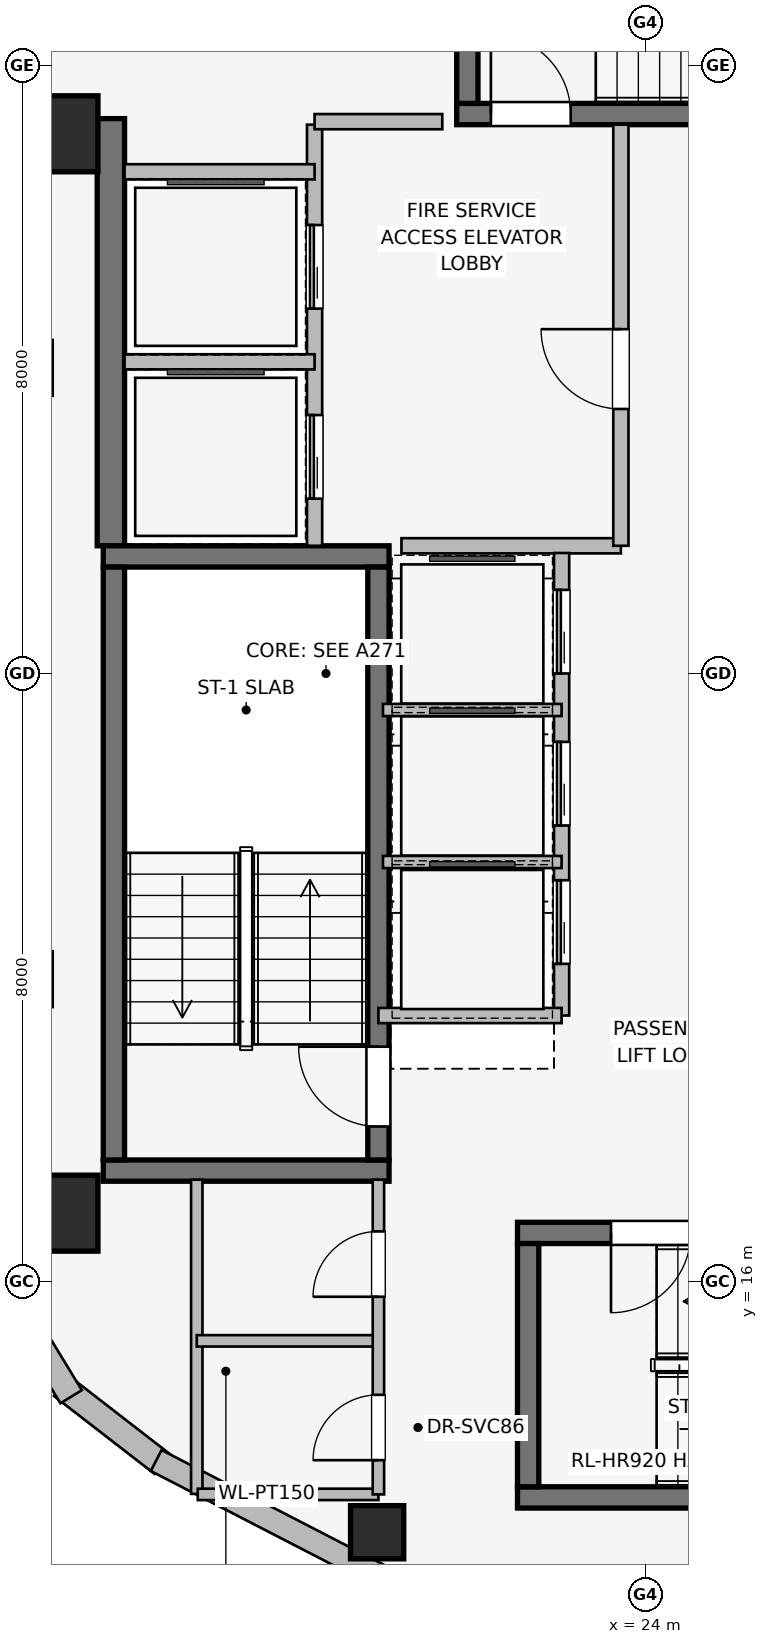
"""IFC4 building model, lengths in metres.
Left out: names, types, materials, properties, quantities, classifications, styles, units other than length and angle.
Written with IfcOpenShell. Run it as: python <this file> out.ifc"""

import sys

from ifc_helpers import new_model, si_unit, direction, frame, frame_2d, origin, origin_2d, place, context, subcontext, project, spatial, rectangle, extrude, element, fill, save


model = new_model("IFC4")
c1 = context("Model", 3, precision=1e-05, world=origin(), true_north=direction((0.0, 1.0)))
c2 = subcontext(c1, "Body", "Model", "MODEL_VIEW")
j1 = project(units=[si_unit("LENGTHUNIT", "METRE"), si_unit("PLANEANGLEUNIT", "RADIAN")], contexts=[c1])
p1 = place(None, origin())
s1 = spatial("IfcSite", under=j1, at=p1, CompositionType="ELEMENT")
p2 = place(p1, origin())
s2 = spatial("IfcBuilding", under=s1, at=p2, CompositionType="ELEMENT")
p3 = place(p2, frame((0.0, 0.0, 252.55)))
s3 = spatial("IfcBuildingStorey", under=s2, at=p3, CompositionType="ELEMENT", Elevation=252.55)
p4 = place(p3, frame((16.97, 25.68, 0.0), z_axis=(0.0, 0.0, 1.0), x_axis=(0.0, 1.0, 0.0)))
e1 = element("IfcWall", 1, at=p4, inside=s3, PredefinedType="SHEAR", context=c2, shape_type="SweptSolid", body=[
    extrude(rectangle(XDim=5.62, YDim=0.36, at=frame_2d((2.81, 0.0))), origin(), (0.0, 0.0, 1.0), 3.55),
])
for number, where, z_axis, x_axis in (
    (2, (16.87, 17.46, 0.0), (0.0, 0.0, 1.0), (1.0, 0.0, 0.0)),
    (3, (20.63, 25.54, 0.0), (0.0, 0.0, 1.0), (-1.0, 0.0, 0.0)),
):
    element("IfcWall", number, at=place(p3, frame(where, z_axis=z_axis, x_axis=x_axis)), inside=s3, PredefinedType="SHEAR", context=c2, shape_type="SweptSolid", body=[
        extrude(rectangle(XDim=3.76, YDim=0.28, at=frame_2d((1.88, 0.0))), origin(), (0.0, 0.0, 1.0), 3.55),
    ])
p5 = place(p3, frame((17.01, 25.4, 0.0), z_axis=(0.0, 0.0, 1.0), x_axis=(0.0, -1.0, 0.0)))
e4 = element("IfcWall", 4, at=p5, inside=s3, PredefinedType="SHEAR", context=c2, shape_type="SweptSolid", body=[
    extrude(rectangle(XDim=7.8, YDim=0.28, at=frame_2d((3.9, 0.0))), origin(), (0.0, 0.0, 1.0), 3.55),
])
p6 = place(p3, frame((20.49, 17.6, 0.0), z_axis=(0.0, 0.0, 1.0), x_axis=(0.0, 1.0, 0.0)))
e5 = element("IfcWall", 5, at=p6, inside=s3, PredefinedType="SHEAR", context=c2, shape_type="SweptSolid", body=[
    extrude(rectangle(XDim=7.8, YDim=0.28, at=frame_2d((3.9, 0.0))), origin(), (0.0, 0.0, 1.0), 3.55),
])
p7 = place(p6, frame((0.44, 0.0, 0.0)))
e6 = element("IfcOpeningElement", 6, at=p7, cuts=e5, PredefinedType="OPENING", context=c2, shape_type="SweptSolid", body=[
    extrude(rectangle(XDim=1.05, YDim=2.0, at=frame_2d((0.525, 1.0))), frame((0.0, 0.15, 0.0), z_axis=(0.0, -1.0, 0.0), x_axis=(1.0, 0.0, 0.0)), (0.0, 0.0, 1.0), 0.3),
])
p8 = place(p3, frame((22.32, 13.16, 0.0), z_axis=(0.0, 0.0, 1.0), x_axis=(1.0, 0.0, 0.0)))
e7 = element("IfcWall", 7, at=p8, inside=s3, PredefinedType="SHEAR", context=c2, shape_type="SweptSolid", body=[
    extrude(rectangle(XDim=8.36, YDim=0.28, at=frame_2d((4.18, 0.0))), origin(), (0.0, 0.0, 1.0), 3.55),
])
p9 = place(p3, frame((30.68, 16.64, 0.0), z_axis=(0.0, 0.0, 1.0), x_axis=(-1.0, 0.0, 0.0)))
e8 = element("IfcWall", 8, at=p9, inside=s3, PredefinedType="SHEAR", context=c2, shape_type="SweptSolid", body=[
    extrude(rectangle(XDim=8.36, YDim=0.28, at=frame_2d((4.18, 0.0))), origin(), (0.0, 0.0, 1.0), 3.55),
])
p10 = place(p9, frame((6.08, 0.0, 0.0)))
e9 = element("IfcOpeningElement", 9, at=p10, cuts=e8, PredefinedType="OPENING", context=c2, shape_type="SweptSolid", body=[
    extrude(rectangle(XDim=1.05, YDim=2.0, at=frame_2d((0.525, 1.0))), frame((0.0, 0.15, 0.0), z_axis=(0.0, -1.0, 0.0), x_axis=(1.0, 0.0, 0.0)), (0.0, 0.0, 1.0), 0.3),
])
p11 = place(p3, frame((22.46, 16.5, 0.0), z_axis=(0.0, 0.0, 1.0), x_axis=(0.0, -1.0, 0.0)))
e10 = element("IfcWall", 10, at=p11, inside=s3, PredefinedType="SHEAR", context=c2, shape_type="SweptSolid", body=[
    extrude(rectangle(XDim=3.2, YDim=0.28, at=frame_2d((1.6, 0.0))), origin(), (0.0, 0.0, 1.0), 3.55),
])
p12 = place(p3, frame((21.52, 31.36, 0.0), z_axis=(0.0, 0.0, 1.0), x_axis=(1.0, 0.0, 0.0)))
e11 = element("IfcWall", 11, at=p12, inside=s3, PredefinedType="SHEAR", context=c2, shape_type="SweptSolid", body=[
    extrude(rectangle(XDim=8.36, YDim=0.28, at=frame_2d((4.18, 0.0))), origin(), (0.0, 0.0, 1.0), 3.55),
])
p13 = place(p12, frame((0.45, 0.0, 0.0)))
e12 = element("IfcOpeningElement", 12, at=p13, cuts=e11, PredefinedType="OPENING", context=c2, shape_type="SweptSolid", body=[
    extrude(rectangle(XDim=1.05, YDim=2.0, at=frame_2d((0.525, 1.0))), frame((0.0, 0.15, 0.0), z_axis=(0.0, -1.0, 0.0), x_axis=(1.0, 0.0, 0.0)), (0.0, 0.0, 1.0), 0.3),
])
p14 = place(p3, frame((21.66, 34.7, 0.0), z_axis=(0.0, 0.0, 1.0), x_axis=(0.0, -1.0, 0.0)))
e13 = element("IfcWall", 13, at=p14, inside=s3, PredefinedType="SHEAR", context=c2, shape_type="SweptSolid", body=[
    extrude(rectangle(XDim=3.2, YDim=0.28, at=frame_2d((1.6, 0.0))), origin(), (0.0, 0.0, 1.0), 3.55),
])
for number, where, z_axis, x_axis in (
    (14, (16.3, 16.9, 0.0), (0.0, 0.0, 1.0), (1.0, 0.0, 0.0)),
    (15, (16.3, 31.1, 0.0), (0.0, 0.0, 1.0), (1.0, 0.0, 0.0)),
):
    element("IfcColumn", number, at=place(p3, frame(where, z_axis=z_axis, x_axis=x_axis)), inside=s3, PredefinedType="COLUMN", context=c2, shape_type="SweptSolid", body=[
        extrude(rectangle(XDim=1.0, YDim=1.0, at=origin_2d()), origin(), (0.0, 0.0, 1.0), 3.55),
    ])
p15 = place(p3, frame((20.473, 12.702, 0.0), z_axis=(0.0, 0.0, 1.0), x_axis=(1.0, 0.0, 0.0)))
e16 = element("IfcColumn", 16, at=p15, inside=s3, PredefinedType="COLUMN", context=c2, shape_type="SweptSolid", body=[
    extrude(rectangle(XDim=0.7, YDim=0.7, at=origin_2d()), origin(), (0.0, 0.0, 1.0), 3.55),
])
p16 = place(p3, frame((15.574, 32.082, 0.0), z_axis=(0.0, 0.0, 1.0), x_axis=(0.520325409202, 0.853968072318, 0.0)))
e17 = element("IfcWall", 17, at=p16, inside=s3, PredefinedType="STANDARD", context=c2, shape_type="SweptSolid", body=[
    extrude(rectangle(XDim=1.678, YDim=0.33, at=frame_2d((0.839, 0.0))), origin(), (0.0, 0.0, 1.0), 3.29),
])
p17 = place(p3, frame((17.647, 13.599, 0.0), z_axis=(0.0, 0.0, 1.0), x_axis=(-0.790691856293, 0.61221433207, 0.0)))
e18 = element("IfcWall", 18, at=p17, inside=s3, PredefinedType="STANDARD", context=c2, shape_type="SweptSolid", body=[
    extrude(rectangle(XDim=1.676, YDim=0.33, at=frame_2d((0.838, 0.0))), origin(), (0.0, 0.0, 1.0), 3.29),
])
p18 = place(p3, frame((16.447, 14.485, 0.0), z_axis=(0.0, 0.0, 1.0), x_axis=(-0.520325409202, 0.853968072318, 0.0)))
e19 = element("IfcWall", 19, at=p18, inside=s3, PredefinedType="STANDARD", context=c2, shape_type="SweptSolid", body=[
    extrude(rectangle(XDim=1.678, YDim=0.33, at=frame_2d((0.839, 0.0))), origin(), (0.0, 0.0, 1.0), 3.29),
])
p19 = place(p3, frame((30.963, 6.73, 0.0), z_axis=(0.0, 0.0, 1.0), x_axis=(-0.888581481622, 0.458718814218, 0.0)))
e20 = element("IfcWall", 20, at=p19, inside=s3, PredefinedType="STANDARD", context=c2, shape_type="SweptSolid", body=[
    extrude(rectangle(XDim=15.077, YDim=0.31, at=frame_2d((7.539, 0.0))), origin(), (0.0, 0.0, 1.0), 3.29),
])
p20 = place(p19, frame((0.998, 0.0, 0.75)))
e21 = element("IfcOpeningElement", 21, at=p20, cuts=e20, PredefinedType="OPENING", context=c2, shape_type="SweptSolid", body=[
    extrude(rectangle(XDim=1.05, YDim=1.4, at=frame_2d((0.525, 0.7))), frame((0.0, 0.165, 0.0), z_axis=(0.0, -1.0, 0.0), x_axis=(1.0, 0.0, 0.0)), (0.0, 0.0, 1.0), 0.33),
])
p21 = place(p19, frame((4.176, 0.0, 0.75)))
e22 = element("IfcOpeningElement", 22, at=p21, cuts=e20, PredefinedType="OPENING", context=c2, shape_type="SweptSolid", body=[
    extrude(rectangle(XDim=1.05, YDim=1.4, at=frame_2d((0.525, 0.7))), frame((0.0, 0.165, 0.0), z_axis=(0.0, -1.0, 0.0), x_axis=(1.0, 0.0, 0.0)), (0.0, 0.0, 1.0), 0.33),
])
p22 = place(p19, frame((6.509, 0.0, 0.75)))
e23 = element("IfcOpeningElement", 23, at=p22, cuts=e20, PredefinedType="OPENING", context=c2, shape_type="SweptSolid", body=[
    extrude(rectangle(XDim=1.05, YDim=1.4, at=frame_2d((0.525, 0.7))), frame((0.0, 0.165, 0.0), z_axis=(0.0, -1.0, 0.0), x_axis=(1.0, 0.0, 0.0)), (0.0, 0.0, 1.0), 0.33),
])
p23 = place(p19, frame((8.842, 0.0, 0.75)))
e24 = element("IfcOpeningElement", 24, at=p23, cuts=e20, PredefinedType="OPENING", context=c2, shape_type="SweptSolid", body=[
    extrude(rectangle(XDim=1.05, YDim=1.4, at=frame_2d((0.525, 0.7))), frame((0.0, 0.165, 0.0), z_axis=(0.0, -1.0, 0.0), x_axis=(1.0, 0.0, 0.0)), (0.0, 0.0, 1.0), 0.33),
])
p24 = place(p3, frame((19.65, 25.68, 0.0), z_axis=(0.0, 0.0, 1.0), x_axis=(0.0, 1.0, 0.0)))
e25 = element("IfcWall", 25, at=p24, inside=s3, PredefinedType="PARTITIONING", context=c2, shape_type="SweptSolid", body=[
    extrude(rectangle(XDim=5.54, YDim=0.2, at=frame_2d((2.77, 0.0))), origin(), (0.0, 0.0, 1.0), 3.29),
])
p25 = place(p24, frame((0.62, 0.0, 0.0)))
e26 = element("IfcOpeningElement", 26, at=p25, cuts=e25, PredefinedType="OPENING", context=c2, shape_type="SweptSolid", body=[
    extrude(rectangle(XDim=1.1, YDim=2.2, at=frame_2d((0.55, 1.1))), frame((0.0, 0.11, 0.0), z_axis=(0.0, -1.0, 0.0), x_axis=(1.0, 0.0, 0.0)), (0.0, 0.0, 1.0), 0.22),
])
p26 = place(p24, frame((3.12, 0.0, 0.0)))
e27 = element("IfcOpeningElement", 27, at=p26, cuts=e25, PredefinedType="OPENING", context=c2, shape_type="SweptSolid", body=[
    extrude(rectangle(XDim=1.1, YDim=2.2, at=frame_2d((0.55, 1.1))), frame((0.0, 0.11, 0.0), z_axis=(0.0, -1.0, 0.0), x_axis=(1.0, 0.0, 0.0)), (0.0, 0.0, 1.0), 0.22),
])
p27 = place(p3, frame((20.793, 25.68, 0.0), z_axis=(0.0, 0.0, 1.0), x_axis=(1.0, 0.0, 0.0)))
e28 = element("IfcWall", 28, at=p27, inside=s3, PredefinedType="PARTITIONING", context=c2, shape_type="SweptSolid", body=[
    extrude(rectangle(XDim=2.887, YDim=0.2, at=frame_2d((1.443, 0.0))), origin(), (0.0, 0.0, 1.0), 3.29),
])
p28 = place(p3, frame((23.68, 25.68, 0.0), z_axis=(0.0, 0.0, 1.0), x_axis=(0.0, 1.0, 0.0)))
e29 = element("IfcWall", 29, at=p28, inside=s3, PredefinedType="PARTITIONING", context=c2, shape_type="SweptSolid", body=[
    extrude(rectangle(XDim=5.54, YDim=0.2, at=frame_2d((2.77, 0.0))), origin(), (0.0, 0.0, 1.0), 3.29),
])
p29 = place(p28, frame((1.8, 0.0, 0.0)))
e30 = element("IfcOpeningElement", 30, at=p29, cuts=e29, PredefinedType="OPENING", context=c2, shape_type="SweptSolid", body=[
    extrude(rectangle(XDim=1.05, YDim=2.0, at=frame_2d((0.525, 1.0))), frame((0.0, 0.11, 0.0), z_axis=(0.0, -1.0, 0.0), x_axis=(1.0, 0.0, 0.0)), (0.0, 0.0, 1.0), 0.22),
])
p30 = place(p3, frame((21.33, 31.26, 0.0), z_axis=(0.0, 0.0, 1.0), x_axis=(-1.0, 0.0, 0.0)))
e31 = element("IfcWall", 31, at=p30, inside=s3, PredefinedType="PARTITIONING", context=c2, shape_type="SweptSolid", body=[
    extrude(rectangle(XDim=1.68, YDim=0.2, at=frame_2d((0.84, 0.0))), origin(), (0.0, 0.0, 1.0), 3.29),
])
p31 = place(p3, frame((17.15, 28.1, 0.0), z_axis=(0.0, 0.0, 1.0), x_axis=(1.0, 0.0, 0.0)))
e32 = element("IfcWall", 32, at=p31, inside=s3, PredefinedType="PARTITIONING", context=c2, shape_type="SweptSolid", body=[
    extrude(rectangle(XDim=2.5, YDim=0.2, at=frame_2d((1.25, 0.0))), origin(), (0.0, 0.0, 1.0), 3.29),
])
p32 = place(p3, frame((19.65, 30.6, 0.0), z_axis=(0.0, 0.0, 1.0), x_axis=(-1.0, 0.0, 0.0)))
e33 = element("IfcWall", 33, at=p32, inside=s3, PredefinedType="PARTITIONING", context=c2, shape_type="SweptSolid", body=[
    extrude(rectangle(XDim=2.5, YDim=0.2, at=frame_2d((1.25, 0.0))), origin(), (0.0, 0.0, 1.0), 2.19),
])
p33 = place(p3, frame((22.9, 19.5, 0.0), z_axis=(0.0, 0.0, 1.0), x_axis=(0.0, 1.0, 0.0)))
e34 = element("IfcWall", 34, at=p33, inside=s3, PredefinedType="PARTITIONING", context=c2, shape_type="SweptSolid", body=[
    extrude(rectangle(XDim=6.085, YDim=0.2, at=frame_2d((3.042, 0.0))), origin(), (0.0, 0.0, 1.0), 3.29),
])
p34 = place(p33, frame((0.68, 0.0, 0.0)))
e35 = element("IfcOpeningElement", 35, at=p34, cuts=e34, PredefinedType="OPENING", context=c2, shape_type="SweptSolid", body=[
    extrude(rectangle(XDim=1.1, YDim=2.2, at=frame_2d((0.55, 1.1))), frame((0.0, 0.11, 0.0), z_axis=(0.0, -1.0, 0.0), x_axis=(1.0, 0.0, 0.0)), (0.0, 0.0, 1.0), 0.22),
])
p35 = place(p33, frame((2.5, 0.0, 0.0)))
e36 = element("IfcOpeningElement", 36, at=p35, cuts=e34, PredefinedType="OPENING", context=c2, shape_type="SweptSolid", body=[
    extrude(rectangle(XDim=1.1, YDim=2.2, at=frame_2d((0.55, 1.1))), frame((0.0, 0.11, 0.0), z_axis=(0.0, -1.0, 0.0), x_axis=(1.0, 0.0, 0.0)), (0.0, 0.0, 1.0), 0.22),
])
p36 = place(p33, frame((4.5, 0.0, 0.0)))
e37 = element("IfcOpeningElement", 37, at=p36, cuts=e34, PredefinedType="OPENING", context=c2, shape_type="SweptSolid", body=[
    extrude(rectangle(XDim=1.1, YDim=2.2, at=frame_2d((0.55, 1.1))), frame((0.0, 0.11, 0.0), z_axis=(0.0, -1.0, 0.0), x_axis=(1.0, 0.0, 0.0)), (0.0, 0.0, 1.0), 0.22),
])
p37 = place(p3, frame((20.49, 19.5, 0.0), z_axis=(0.0, 0.0, 1.0), x_axis=(1.0, 0.0, 0.0)))
e38 = element("IfcWall", 38, at=p37, inside=s3, PredefinedType="PARTITIONING", context=c2, shape_type="SweptSolid", body=[
    extrude(rectangle(XDim=2.41, YDim=0.2, at=frame_2d((1.205, 0.0))), origin(), (0.0, 0.0, 1.0), 2.19),
])
for number, where, z_axis, x_axis in (
    (39, (20.55, 21.52, 0.0), (0.0, 0.0, 1.0), (1.0, 0.0, 0.0)),
    (40, (20.55, 23.52, 0.0), (0.0, 0.0, 1.0), (1.0, 0.0, 0.0)),
):
    element("IfcWall", number, at=place(p3, frame(where, z_axis=z_axis, x_axis=x_axis)), inside=s3, PredefinedType="PARTITIONING", context=c2, shape_type="SweptSolid", body=[
        extrude(rectangle(XDim=2.35, YDim=0.16, at=frame_2d((1.175, 0.0))), origin(), (0.0, 0.0, 1.0), 3.29),
    ])
p38 = place(p3, frame((18.1, 17.34, 0.0), z_axis=(0.0, 0.0, 1.0), x_axis=(0.0, -1.0, 0.0)))
e41 = element("IfcWall", 41, at=p38, inside=s3, PredefinedType="PARTITIONING", context=c2, shape_type="SweptSolid", body=[
    extrude(rectangle(XDim=4.133, YDim=0.15, at=frame_2d((2.066, 0.0))), origin(), (0.0, 0.0, 1.0), 3.29),
])
p39 = place(p3, frame((18.113, 13.2, 0.0), z_axis=(0.0, 0.0, 1.0), x_axis=(1.0, 0.0, 0.0)))
e42 = element("IfcWall", 42, at=p39, inside=s3, PredefinedType="PARTITIONING", context=c2, shape_type="SweptSolid", body=[
    extrude(rectangle(XDim=2.377, YDim=0.15, at=frame_2d((1.188, 0.0))), origin(), (0.0, 0.0, 1.0), 3.29),
])
p40 = place(p3, frame((18.1, 15.22, 0.0), z_axis=(0.0, 0.0, 1.0), x_axis=(1.0, 0.0, 0.0)))
e43 = element("IfcWall", 43, at=p40, inside=s3, PredefinedType="PARTITIONING", context=c2, shape_type="SweptSolid", body=[
    extrude(rectangle(XDim=2.39, YDim=0.15, at=frame_2d((1.195, 0.0))), origin(), (0.0, 0.0, 1.0), 3.29),
])
p41 = place(p3, frame((20.49, 13.2, 0.0), z_axis=(0.0, 0.0, 1.0), x_axis=(0.0, 1.0, 0.0)))
e44 = element("IfcWall", 44, at=p41, inside=s3, PredefinedType="PARTITIONING", context=c2, shape_type="SweptSolid", body=[
    extrude(rectangle(XDim=4.14, YDim=0.15, at=frame_2d((2.07, 0.0))), origin(), (0.0, 0.0, 1.0), 3.29),
])
p42 = place(p41, frame((0.45, 0.0, 0.0)))
e45 = element("IfcOpeningElement", 45, at=p42, cuts=e44, PredefinedType="OPENING", context=c2, shape_type="SweptSolid", body=[
    extrude(rectangle(XDim=0.86, YDim=2.0, at=frame_2d((0.43, 1.0))), frame((0.0, 0.085, 0.0), z_axis=(0.0, -1.0, 0.0), x_axis=(1.0, 0.0, 0.0)), (0.0, 0.0, 1.0), 0.17),
])
p43 = place(p41, frame((2.6, 0.0, 0.0)))
e46 = element("IfcOpeningElement", 46, at=p43, cuts=e44, PredefinedType="OPENING", context=c2, shape_type="SweptSolid", body=[
    extrude(rectangle(XDim=0.86, YDim=2.0, at=frame_2d((0.43, 1.0))), frame((0.0, 0.085, 0.0), z_axis=(0.0, -1.0, 0.0), x_axis=(1.0, 0.0, 0.0)), (0.0, 0.0, 1.0), 0.17),
])
p44 = place(p7, origin())
e47 = element("IfcDoor", 47, at=p44, inside=s3, OperationType="SINGLE_SWING_RIGHT", PredefinedType="DOOR", context=c2, shape_type="SweptSolid", body=[
    extrude(rectangle(XDim=1.05, YDim=2.0, at=frame_2d((0.525, 1.0))), frame((0.0, 0.025, 0.0), z_axis=(0.0, -1.0, 0.0), x_axis=(1.0, 0.0, 0.0)), (0.0, 0.0, 1.0), 0.05),
])
fill(e6, e47)
p45 = place(p10, origin())
e48 = element("IfcDoor", 48, at=p45, inside=s3, OperationType="SINGLE_SWING_RIGHT", PredefinedType="DOOR", context=c2, shape_type="SweptSolid", body=[
    extrude(rectangle(XDim=1.05, YDim=2.0, at=frame_2d((0.525, 1.0))), frame((0.0, 0.025, 0.0), z_axis=(0.0, -1.0, 0.0), x_axis=(1.0, 0.0, 0.0)), (0.0, 0.0, 1.0), 0.05),
])
fill(e9, e48)
p46 = place(p13, origin())
e49 = element("IfcDoor", 49, at=p46, inside=s3, OperationType="SINGLE_SWING_LEFT", PredefinedType="DOOR", context=c2, shape_type="SweptSolid", body=[
    extrude(rectangle(XDim=1.05, YDim=2.0, at=frame_2d((0.525, 1.0))), frame((0.0, 0.025, 0.0), z_axis=(0.0, -1.0, 0.0), x_axis=(1.0, 0.0, 0.0)), (0.0, 0.0, 1.0), 0.05),
])
fill(e12, e49)
p47 = place(p25, origin())
e50 = element("IfcDoor", 50, at=p47, inside=s3, OperationType="SLIDING_TO_LEFT", PredefinedType="DOOR", context=c2, shape_type="SweptSolid", body=[
    extrude(rectangle(XDim=1.1, YDim=2.2, at=frame_2d((0.55, 1.1))), frame((0.0, 0.025, 0.0), z_axis=(0.0, -1.0, 0.0), x_axis=(1.0, 0.0, 0.0)), (0.0, 0.0, 1.0), 0.05),
])
fill(e26, e50)
p48 = place(p26, origin())
e51 = element("IfcDoor", 51, at=p48, inside=s3, OperationType="SLIDING_TO_LEFT", PredefinedType="DOOR", context=c2, shape_type="SweptSolid", body=[
    extrude(rectangle(XDim=1.1, YDim=2.2, at=frame_2d((0.55, 1.1))), frame((0.0, 0.025, 0.0), z_axis=(0.0, -1.0, 0.0), x_axis=(1.0, 0.0, 0.0)), (0.0, 0.0, 1.0), 0.05),
])
fill(e27, e51)
p49 = place(p29, origin())
e52 = element("IfcDoor", 52, at=p49, inside=s3, OperationType="SINGLE_SWING_RIGHT", PredefinedType="DOOR", context=c2, shape_type="SweptSolid", body=[
    extrude(rectangle(XDim=1.05, YDim=2.0, at=frame_2d((0.525, 1.0))), frame((0.0, 0.025, 0.0), z_axis=(0.0, -1.0, 0.0), x_axis=(1.0, 0.0, 0.0)), (0.0, 0.0, 1.0), 0.05),
])
fill(e30, e52)
p50 = place(p34, origin())
e53 = element("IfcDoor", 53, at=p50, inside=s3, OperationType="SLIDING_TO_LEFT", PredefinedType="DOOR", context=c2, shape_type="SweptSolid", body=[
    extrude(rectangle(XDim=1.1, YDim=2.2, at=frame_2d((0.55, 1.1))), frame((0.0, 0.025, 0.0), z_axis=(0.0, -1.0, 0.0), x_axis=(1.0, 0.0, 0.0)), (0.0, 0.0, 1.0), 0.05),
])
fill(e35, e53)
p51 = place(p35, origin())
e54 = element("IfcDoor", 54, at=p51, inside=s3, OperationType="SLIDING_TO_LEFT", PredefinedType="DOOR", context=c2, shape_type="SweptSolid", body=[
    extrude(rectangle(XDim=1.1, YDim=2.2, at=frame_2d((0.55, 1.1))), frame((0.0, 0.025, 0.0), z_axis=(0.0, -1.0, 0.0), x_axis=(1.0, 0.0, 0.0)), (0.0, 0.0, 1.0), 0.05),
])
fill(e36, e54)
p52 = place(p36, origin())
e55 = element("IfcDoor", 55, at=p52, inside=s3, OperationType="SLIDING_TO_LEFT", PredefinedType="DOOR", context=c2, shape_type="SweptSolid", body=[
    extrude(rectangle(XDim=1.1, YDim=2.2, at=frame_2d((0.55, 1.1))), frame((0.0, 0.025, 0.0), z_axis=(0.0, -1.0, 0.0), x_axis=(1.0, 0.0, 0.0)), (0.0, 0.0, 1.0), 0.05),
])
fill(e37, e55)
p53 = place(p42, origin())
e56 = element("IfcDoor", 56, at=p53, inside=s3, OperationType="SINGLE_SWING_LEFT", PredefinedType="DOOR", context=c2, shape_type="SweptSolid", body=[
    extrude(rectangle(XDim=0.86, YDim=2.0, at=frame_2d((0.43, 1.0))), frame((0.0, 0.025, 0.0), z_axis=(0.0, -1.0, 0.0), x_axis=(1.0, 0.0, 0.0)), (0.0, 0.0, 1.0), 0.05),
])
fill(e45, e56)
p54 = place(p43, origin())
e57 = element("IfcDoor", 57, at=p54, inside=s3, OperationType="SINGLE_SWING_LEFT", PredefinedType="DOOR", context=c2, shape_type="SweptSolid", body=[
    extrude(rectangle(XDim=0.86, YDim=2.0, at=frame_2d((0.43, 1.0))), frame((0.0, 0.025, 0.0), z_axis=(0.0, -1.0, 0.0), x_axis=(1.0, 0.0, 0.0)), (0.0, 0.0, 1.0), 0.05),
])
fill(e46, e57)
save(model, sys.argv[1])
